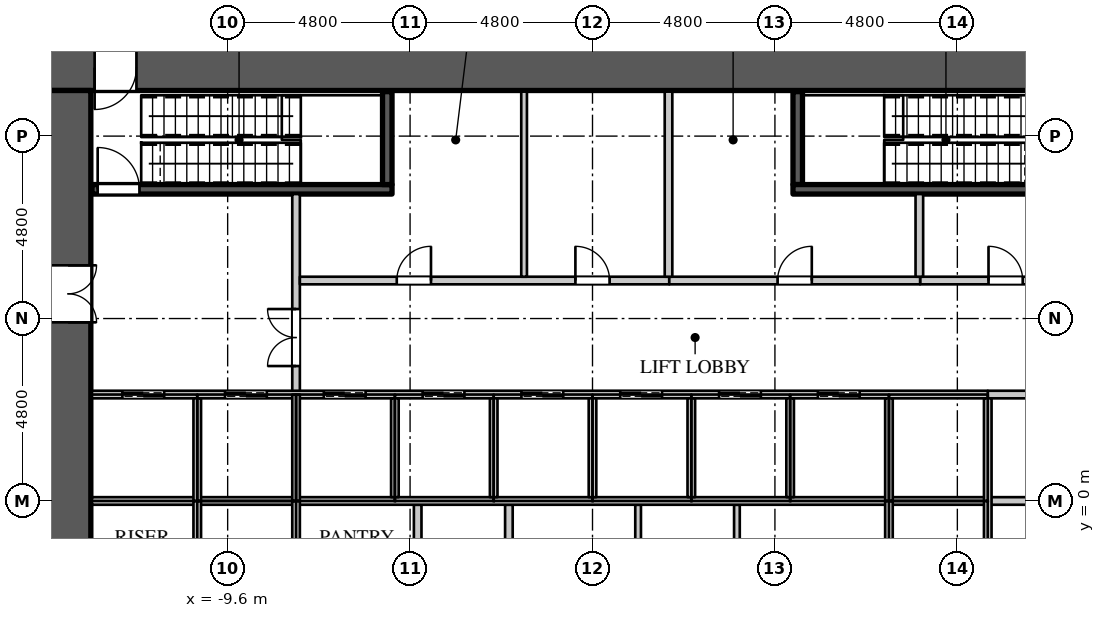
"""IFC4 building model, lengths in metres.
Left out: names, types, materials, properties, quantities, classifications, styles, units other than length and angle.
Written with IfcOpenShell. Run it as: python <this file> out.ifc"""

import sys

from ifc_helpers import new_model, si_unit, direction, frame, frame_2d, origin, place, context, subcontext, project, spatial, rectangle, extrude, element, fill, save


model = new_model("IFC4")
c1 = context("Model", 3, precision=1e-05, world=origin(), true_north=direction((0.0, 1.0)))
c2 = subcontext(c1, "Body", "Model", "MODEL_VIEW")
j1 = project(units=[si_unit("LENGTHUNIT", "METRE"), si_unit("PLANEANGLEUNIT", "RADIAN")], contexts=[c1])
p1 = place(None, origin())
s1 = spatial("IfcSite", under=j1, at=p1, CompositionType="ELEMENT")
p2 = place(p1, origin())
s2 = spatial("IfcBuilding", under=s1, at=p2, CompositionType="ELEMENT")
p3 = place(p2, frame((0.0, 0.0, 6.0)))
s3 = spatial("IfcBuildingStorey", under=s2, at=p3, CompositionType="ELEMENT", Elevation=6.0)
p4 = place(p3, frame((-14.4, 11.4, 0.0), z_axis=(0.0, 0.0, 1.0), x_axis=(1.0, 0.0, 0.0)))
e1 = element("IfcWall", 1, at=p4, inside=s3, PredefinedType="SHEAR", context=c2, shape_type="SweptSolid", body=[
    extrude(rectangle(XDim=28.8, YDim=1.2, at=frame_2d((14.4, 0.0))), origin(), (0.0, 0.0, 1.0), 5.0),
])
p5 = place(p4, frame((1.3, 0.0, 0.0)))
e2 = element("IfcOpeningElement", 2, at=p5, cuts=e1, PredefinedType="OPENING", context=c2, shape_type="SweptSolid", body=[
    extrude(rectangle(XDim=1.1, YDim=2.2, at=frame_2d((0.55, 1.1))), frame((0.0, 0.61, 0.0), z_axis=(0.0, -1.0, 0.0), x_axis=(1.0, 0.0, 0.0)), (0.0, 0.0, 1.0), 1.22),
])
p6 = place(p4, frame((26.4, 0.0, 0.0)))
e3 = element("IfcOpeningElement", 3, at=p6, cuts=e1, PredefinedType="OPENING", context=c2, shape_type="SweptSolid", body=[
    extrude(rectangle(XDim=1.1, YDim=2.2, at=frame_2d((0.55, 1.1))), frame((0.0, 0.61, 0.0), z_axis=(0.0, -1.0, 0.0), x_axis=(1.0, 0.0, 0.0)), (0.0, 0.0, 1.0), 1.22),
])
p7 = place(p3, frame((-13.8, -10.8, 0.0), z_axis=(0.0, 0.0, 1.0), x_axis=(0.0, 1.0, 0.0)))
e4 = element("IfcWall", 4, at=p7, inside=s3, PredefinedType="SHEAR", context=c2, shape_type="SweptSolid", body=[
    extrude(rectangle(XDim=21.6, YDim=1.2, at=frame_2d((10.8, 0.0))), origin(), (0.0, 0.0, 1.0), 5.0),
])
p8 = place(p7, frame((15.5, 0.0, 0.0)))
e5 = element("IfcOpeningElement", 5, at=p8, cuts=e4, PredefinedType="OPENING", context=c2, shape_type="SweptSolid", body=[
    extrude(rectangle(XDim=1.5, YDim=2.4, at=frame_2d((0.75, 1.2))), frame((0.0, 0.61, 0.0), z_axis=(0.0, -1.0, 0.0), x_axis=(1.0, 0.0, 0.0)), (0.0, 0.0, 1.0), 1.22),
])
p9 = place(p7, frame((4.5, 0.0, 0.0)))
e6 = element("IfcOpeningElement", 6, at=p9, cuts=e4, PredefinedType="OPENING", context=c2, shape_type="SweptSolid", body=[
    extrude(rectangle(XDim=1.5, YDim=2.4, at=frame_2d((0.75, 1.2))), frame((0.0, 0.61, 0.0), z_axis=(0.0, -1.0, 0.0), x_axis=(1.0, 0.0, 0.0)), (0.0, 0.0, 1.0), 1.22),
])
p10 = place(p3, frame((-7.8, 2.8, 0.0), z_axis=(0.0, 0.0, 1.0), x_axis=(0.0, 1.0, 0.0)))
e7 = element("IfcWall", 7, at=p10, inside=s3, PredefinedType="PARTITIONING", context=c2, shape_type="SweptSolid", body=[
    extrude(rectangle(XDim=5.275, YDim=0.2, at=frame_2d((2.637, 0.0))), origin(), (0.0, 0.0, 1.0), 4.4),
])
p11 = place(p10, frame((0.75, 0.0, 0.0)))
e8 = element("IfcOpeningElement", 8, at=p11, cuts=e7, PredefinedType="OPENING", context=c2, shape_type="SweptSolid", body=[
    extrude(rectangle(XDim=1.5, YDim=2.4, at=frame_2d((0.75, 1.2))), frame((0.0, 0.11, 0.0), z_axis=(0.0, -1.0, 0.0), x_axis=(1.0, 0.0, 0.0)), (0.0, 0.0, 1.0), 0.22),
])
p12 = place(p3, frame((-7.7, 5.8, 0.0), z_axis=(0.0, 0.0, 1.0), x_axis=(1.0, 0.0, 0.0)))
e9 = element("IfcWall", 9, at=p12, inside=s3, PredefinedType="PARTITIONING", context=c2, shape_type="SweptSolid", body=[
    extrude(rectangle(XDim=9.72, YDim=0.2, at=frame_2d((4.86, 0.0))), origin(), (0.0, 0.0, 1.0), 4.4),
])
p13 = place(p12, frame((2.55, 0.0, 0.0)))
e10 = element("IfcOpeningElement", 10, at=p13, cuts=e9, PredefinedType="OPENING", context=c2, shape_type="SweptSolid", body=[
    extrude(rectangle(XDim=0.9, YDim=2.2, at=frame_2d((0.45, 1.1))), frame((0.0, 0.11, 0.0), z_axis=(0.0, -1.0, 0.0), x_axis=(1.0, 0.0, 0.0)), (0.0, 0.0, 1.0), 0.22),
])
p14 = place(p12, frame((7.25, 0.0, 0.0)))
e11 = element("IfcOpeningElement", 11, at=p14, cuts=e9, PredefinedType="OPENING", context=c2, shape_type="SweptSolid", body=[
    extrude(rectangle(XDim=0.9, YDim=2.2, at=frame_2d((0.45, 1.1))), frame((0.0, 0.11, 0.0), z_axis=(0.0, -1.0, 0.0), x_axis=(1.0, 0.0, 0.0)), (0.0, 0.0, 1.0), 0.22),
])
p15 = place(p3, frame((8.62, 5.8, 0.0), z_axis=(0.0, 0.0, 1.0), x_axis=(1.0, 0.0, 0.0)))
e12 = element("IfcWall", 12, at=p15, inside=s3, PredefinedType="PARTITIONING", context=c2, shape_type="SweptSolid", body=[
    extrude(rectangle(XDim=4.55, YDim=0.2, at=frame_2d((2.275, 0.0))), origin(), (0.0, 0.0, 1.0), 4.4),
])
p16 = place(p15, frame((1.8, 0.0, 0.0)))
e13 = element("IfcOpeningElement", 13, at=p16, cuts=e12, PredefinedType="OPENING", context=c2, shape_type="SweptSolid", body=[
    extrude(rectangle(XDim=0.9, YDim=2.2, at=frame_2d((0.45, 1.1))), frame((0.0, 0.11, 0.0), z_axis=(0.0, -1.0, 0.0), x_axis=(1.0, 0.0, 0.0)), (0.0, 0.0, 1.0), 0.22),
])
p17 = place(p3, frame((-1.8, 5.9, 0.0), z_axis=(0.0, 0.0, 1.0), x_axis=(0.0, 1.0, 0.0)))
e14 = element("IfcWall", 14, at=p17, inside=s3, PredefinedType="PARTITIONING", context=c2, shape_type="SweptSolid", body=[
    extrude(rectangle(XDim=4.87, YDim=0.15, at=frame_2d((2.435, 0.0))), origin(), (0.0, 0.0, 1.0), 4.4),
])
for number, where, z_axis, x_axis in (
    (15, (1.2, -2.7, 0.0), (0.0, 0.0, 1.0), (0.0, 1.0, 0.0)),
    (16, (3.8, -2.7, 0.0), (0.0, 0.0, 1.0), (0.0, 1.0, 0.0)),
):
    element("IfcWall", number, at=place(p3, frame(where, z_axis=z_axis, x_axis=x_axis)), inside=s3, PredefinedType="PARTITIONING", context=c2, shape_type="SweptSolid", body=[
        extrude(rectangle(XDim=2.6, YDim=0.15, at=frame_2d((1.3, 0.0))), origin(), (0.0, 0.0, 1.0), 4.4),
    ])
for number, where, z_axis, x_axis in (
    (17, (-4.6, -2.7, 0.0), (0.0, 0.0, 1.0), (0.0, 1.0, 0.0)),
    (18, (-2.2, -2.7, 0.0), (0.0, 0.0, 1.0), (0.0, 1.0, 0.0)),
):
    element("IfcWall", number, at=place(p3, frame(where, z_axis=z_axis, x_axis=x_axis)), inside=s3, PredefinedType="PARTITIONING", context=c2, shape_type="SweptSolid", body=[
        extrude(rectangle(XDim=2.6, YDim=0.2, at=frame_2d((1.3, 0.0))), origin(), (0.0, 0.0, 1.0), 4.4),
    ])
p18 = place(p3, frame((2.02, 5.8, 0.0), z_axis=(0.0, 0.0, 1.0), x_axis=(1.0, 0.0, 0.0)))
e19 = element("IfcWall", 19, at=p18, inside=s3, PredefinedType="PARTITIONING", context=c2, shape_type="SweptSolid", body=[
    extrude(rectangle(XDim=6.6, YDim=0.2, at=frame_2d((3.3, 0.0))), origin(), (0.0, 0.0, 1.0), 4.4),
])
p19 = place(p18, frame((2.85, 0.0, 0.0)))
e20 = element("IfcOpeningElement", 20, at=p19, cuts=e19, PredefinedType="OPENING", context=c2, shape_type="SweptSolid", body=[
    extrude(rectangle(XDim=0.9, YDim=2.2, at=frame_2d((0.45, 1.1))), frame((0.0, 0.11, 0.0), z_axis=(0.0, -1.0, 0.0), x_axis=(1.0, 0.0, 0.0)), (0.0, 0.0, 1.0), 0.22),
])
p20 = place(p3, frame((2.0, 5.9, 0.0), z_axis=(0.0, 0.0, 1.0), x_axis=(0.0, 1.0, 0.0)))
e21 = element("IfcWall", 21, at=p20, inside=s3, PredefinedType="PARTITIONING", context=c2, shape_type="SweptSolid", body=[
    extrude(rectangle(XDim=4.87, YDim=0.2, at=frame_2d((2.435, 0.0))), origin(), (0.0, 0.0, 1.0), 4.4),
])
p21 = place(p3, frame((8.6, 5.9, 0.0), z_axis=(0.0, 0.0, 1.0), x_axis=(0.0, 1.0, 0.0)))
e22 = element("IfcWall", 22, at=p21, inside=s3, PredefinedType="PARTITIONING", context=c2, shape_type="SweptSolid", body=[
    extrude(rectangle(XDim=2.175, YDim=0.2, at=frame_2d((1.087, 0.0))), origin(), (0.0, 0.0, 1.0), 4.4),
])
p22 = place(p3, frame((10.4, 2.8, 0.0), z_axis=(0.0, 0.0, 1.0), x_axis=(1.0, 0.0, 0.0)))
e23 = element("IfcWall", 23, at=p22, inside=s3, PredefinedType="PARTITIONING", context=c2, shape_type="SweptSolid", body=[
    extrude(rectangle(XDim=2.77, YDim=0.2, at=frame_2d((1.385, 0.0))), origin(), (0.0, 0.0, 1.0), 4.4),
])
p23 = place(p22, frame((1.05, 0.0, 0.0)))
e24 = element("IfcOpeningElement", 24, at=p23, cuts=e23, PredefinedType="OPENING", context=c2, shape_type="SweptSolid", body=[
    extrude(rectangle(XDim=0.6, YDim=2.0, at=frame_2d((0.3, 1.0))), frame((0.0, 0.11, 0.0), z_axis=(0.0, -1.0, 0.0), x_axis=(1.0, 0.0, 0.0)), (0.0, 0.0, 1.0), 0.22),
])
p24 = place(p3, frame((10.4, 0.0, 0.0), z_axis=(0.0, 0.0, 1.0), x_axis=(1.0, 0.0, 0.0)))
e25 = element("IfcWall", 25, at=p24, inside=s3, PredefinedType="PARTITIONING", context=c2, shape_type="SweptSolid", body=[
    extrude(rectangle(XDim=2.77, YDim=0.2, at=frame_2d((1.385, 0.0))), origin(), (0.0, 0.0, 1.0), 4.4),
])
p25 = place(p3, frame((-13.17, 0.0, 0.0), z_axis=(0.0, 0.0, 1.0), x_axis=(1.0, 0.0, 0.0)))
e26 = element("IfcWall", 26, at=p25, inside=s3, PredefinedType="PARTITIONING", context=c2, shape_type="SweptSolid", body=[
    extrude(rectangle(XDim=23.57, YDim=0.2, at=frame_2d((11.785, 0.0))), origin(), (0.0, 0.0, 1.0), 4.4),
])
p26 = place(p3, frame((-13.17, 2.8, 0.0), z_axis=(0.0, 0.0, 1.0), x_axis=(1.0, 0.0, 0.0)))
e27 = element("IfcWall", 27, at=p26, inside=s3, PredefinedType="PARTITIONING", context=c2, shape_type="SweptSolid", body=[
    extrude(rectangle(XDim=23.57, YDim=0.2, at=frame_2d((11.785, 0.0))), origin(), (0.0, 0.0, 1.0), 4.4),
])
p27 = place(p26, frame((0.8, 0.0, 0.0)))
e28 = element("IfcOpeningElement", 28, at=p27, cuts=e27, PredefinedType="OPENING", context=c2, shape_type="SweptSolid", body=[
    extrude(rectangle(XDim=1.1, YDim=2.2, at=frame_2d((0.55, 1.1))), frame((0.0, 0.11, 0.0), z_axis=(0.0, -1.0, 0.0), x_axis=(1.0, 0.0, 0.0)), (0.0, 0.0, 1.0), 0.22),
])
p28 = place(p26, frame((3.5, 0.0, 0.0)))
e29 = element("IfcOpeningElement", 29, at=p28, cuts=e27, PredefinedType="OPENING", context=c2, shape_type="SweptSolid", body=[
    extrude(rectangle(XDim=1.1, YDim=2.2, at=frame_2d((0.55, 1.1))), frame((0.0, 0.11, 0.0), z_axis=(0.0, -1.0, 0.0), x_axis=(1.0, 0.0, 0.0)), (0.0, 0.0, 1.0), 0.22),
])
p29 = place(p26, frame((6.1, 0.0, 0.0)))
e30 = element("IfcOpeningElement", 30, at=p29, cuts=e27, PredefinedType="OPENING", context=c2, shape_type="SweptSolid", body=[
    extrude(rectangle(XDim=1.1, YDim=2.2, at=frame_2d((0.55, 1.1))), frame((0.0, 0.11, 0.0), z_axis=(0.0, -1.0, 0.0), x_axis=(1.0, 0.0, 0.0)), (0.0, 0.0, 1.0), 0.22),
])
p30 = place(p26, frame((8.7, 0.0, 0.0)))
e31 = element("IfcOpeningElement", 31, at=p30, cuts=e27, PredefinedType="OPENING", context=c2, shape_type="SweptSolid", body=[
    extrude(rectangle(XDim=1.1, YDim=2.2, at=frame_2d((0.55, 1.1))), frame((0.0, 0.11, 0.0), z_axis=(0.0, -1.0, 0.0), x_axis=(1.0, 0.0, 0.0)), (0.0, 0.0, 1.0), 0.22),
])
p31 = place(p26, frame((11.3, 0.0, 0.0)))
e32 = element("IfcOpeningElement", 32, at=p31, cuts=e27, PredefinedType="OPENING", context=c2, shape_type="SweptSolid", body=[
    extrude(rectangle(XDim=1.1, YDim=2.2, at=frame_2d((0.55, 1.1))), frame((0.0, 0.11, 0.0), z_axis=(0.0, -1.0, 0.0), x_axis=(1.0, 0.0, 0.0)), (0.0, 0.0, 1.0), 0.22),
])
p32 = place(p26, frame((13.9, 0.0, 0.0)))
e33 = element("IfcOpeningElement", 33, at=p32, cuts=e27, PredefinedType="OPENING", context=c2, shape_type="SweptSolid", body=[
    extrude(rectangle(XDim=1.1, YDim=2.2, at=frame_2d((0.55, 1.1))), frame((0.0, 0.11, 0.0), z_axis=(0.0, -1.0, 0.0), x_axis=(1.0, 0.0, 0.0)), (0.0, 0.0, 1.0), 0.22),
])
p33 = place(p26, frame((16.5, 0.0, 0.0)))
e34 = element("IfcOpeningElement", 34, at=p33, cuts=e27, PredefinedType="OPENING", context=c2, shape_type="SweptSolid", body=[
    extrude(rectangle(XDim=1.1, YDim=2.2, at=frame_2d((0.55, 1.1))), frame((0.0, 0.11, 0.0), z_axis=(0.0, -1.0, 0.0), x_axis=(1.0, 0.0, 0.0)), (0.0, 0.0, 1.0), 0.22),
])
p34 = place(p26, frame((19.1, 0.0, 0.0)))
e35 = element("IfcOpeningElement", 35, at=p34, cuts=e27, PredefinedType="OPENING", context=c2, shape_type="SweptSolid", body=[
    extrude(rectangle(XDim=1.1, YDim=2.2, at=frame_2d((0.55, 1.1))), frame((0.0, 0.11, 0.0), z_axis=(0.0, -1.0, 0.0), x_axis=(1.0, 0.0, 0.0)), (0.0, 0.0, 1.0), 0.22),
])
for number, where, z_axis, x_axis in (
    (36, (-10.4, -2.7, 0.0), (0.0, 0.0, 1.0), (0.0, 1.0, 0.0)),
    (37, (-10.4, 0.0, 0.0), (0.0, 0.0, 1.0), (0.0, 1.0, 0.0)),
):
    element("IfcWall", number, at=place(p3, frame(where, z_axis=z_axis, x_axis=x_axis)), inside=s3, PredefinedType="PARTITIONING", context=c2, shape_type="SweptSolid", body=[
        extrude(rectangle(XDim=2.7, YDim=0.2, at=frame_2d((1.35, 0.0))), origin(), (0.0, 0.0, 1.0), 4.4),
    ])
for number, where, z_axis, x_axis in (
    (38, (-7.8, -2.8, 0.0), (0.0, 0.0, 1.0), (0.0, 1.0, 0.0)),
    (39, (-7.8, 0.0, 0.0), (0.0, 0.0, 1.0), (0.0, 1.0, 0.0)),
):
    element("IfcWall", number, at=place(p3, frame(where, z_axis=z_axis, x_axis=x_axis)), inside=s3, PredefinedType="PARTITIONING", context=c2, shape_type="SweptSolid", body=[
        extrude(rectangle(XDim=2.8, YDim=0.2, at=frame_2d((1.4, 0.0))), origin(), (0.0, 0.0, 1.0), 4.4),
    ])
for number, where, z_axis, x_axis in (
    (40, (-5.2, 0.1, 0.0), (0.0, 0.0, 1.0), (0.0, 1.0, 0.0)),
    (41, (-2.6, 0.1, 0.0), (0.0, 0.0, 1.0), (0.0, 1.0, 0.0)),
    (42, (0.0, 0.1, 0.0), (0.0, 0.0, 1.0), (0.0, 1.0, 0.0)),
    (43, (2.6, 0.1, 0.0), (0.0, 0.0, 1.0), (0.0, 1.0, 0.0)),
    (44, (5.2, 0.1, 0.0), (0.0, 0.0, 1.0), (0.0, 1.0, 0.0)),
):
    element("IfcWall", number, at=place(p3, frame(where, z_axis=z_axis, x_axis=x_axis)), inside=s3, PredefinedType="PARTITIONING", context=c2, shape_type="SweptSolid", body=[
        extrude(rectangle(XDim=2.6, YDim=0.2, at=frame_2d((1.3, 0.0))), origin(), (0.0, 0.0, 1.0), 4.4),
    ])
for number, where, z_axis, x_axis in (
    (45, (7.8, -2.7, 0.0), (0.0, 0.0, 1.0), (0.0, 1.0, 0.0)),
    (46, (7.8, 0.0, 0.0), (0.0, 0.0, 1.0), (0.0, 1.0, 0.0)),
):
    element("IfcWall", number, at=place(p3, frame(where, z_axis=z_axis, x_axis=x_axis)), inside=s3, PredefinedType="PARTITIONING", context=c2, shape_type="SweptSolid", body=[
        extrude(rectangle(XDim=2.7, YDim=0.2, at=frame_2d((1.35, 0.0))), origin(), (0.0, 0.0, 1.0), 4.4),
    ])
p35 = place(p3, frame((10.4, -2.7, 0.0), z_axis=(0.0, 0.0, 1.0), x_axis=(0.0, 1.0, 0.0)))
e47 = element("IfcWall", 47, at=p35, inside=s3, PredefinedType="PARTITIONING", context=c2, shape_type="SweptSolid", body=[
    extrude(rectangle(XDim=5.4, YDim=0.2, at=frame_2d((2.7, 0.0))), origin(), (0.0, 0.0, 1.0), 4.4),
])
p36 = place(p3, frame((-13.17, 8.2, 0.0), z_axis=(0.0, 0.0, 1.0), x_axis=(1.0, 0.0, 0.0)))
e48 = element("IfcWall", 48, at=p36, inside=s3, PredefinedType="SHEAR", context=c2, shape_type="SweptSolid", body=[
    extrude(rectangle(XDim=7.895, YDim=0.25, at=frame_2d((3.948, 0.0))), origin(), (0.0, 0.0, 1.0), 4.65),
])
p37 = place(p36, frame((0.15, 0.0, 0.0)))
e49 = element("IfcOpeningElement", 49, at=p37, cuts=e48, PredefinedType="OPENING", context=c2, shape_type="SweptSolid", body=[
    extrude(rectangle(XDim=1.1, YDim=2.2, at=frame_2d((0.55, 1.1))), frame((0.0, 0.135, 0.0), z_axis=(0.0, -1.0, 0.0), x_axis=(1.0, 0.0, 0.0)), (0.0, 0.0, 1.0), 0.27),
])
for number, where, z_axis, x_axis in (
    (50, (-5.4, 8.325, 0.0), (0.0, 0.0, 1.0), (0.0, 1.0, 0.0)),
    (51, (5.4, 8.325, 0.0), (0.0, 0.0, 1.0), (0.0, 1.0, 0.0)),
):
    element("IfcWall", number, at=place(p3, frame(where, z_axis=z_axis, x_axis=x_axis)), inside=s3, PredefinedType="SHEAR", context=c2, shape_type="SweptSolid", body=[
        extrude(rectangle(XDim=2.445, YDim=0.25, at=frame_2d((1.223, 0.0))), origin(), (0.0, 0.0, 1.0), 4.65),
    ])
p38 = place(p3, frame((5.275, 8.2, 0.0), z_axis=(0.0, 0.0, 1.0), x_axis=(1.0, 0.0, 0.0)))
e52 = element("IfcWall", 52, at=p38, inside=s3, PredefinedType="SHEAR", context=c2, shape_type="SweptSolid", body=[
    extrude(rectangle(XDim=7.895, YDim=0.25, at=frame_2d((3.948, 0.0))), origin(), (0.0, 0.0, 1.0), 4.65),
])
p39 = place(p13, origin())
e53 = element("IfcDoor", 53, at=p39, inside=s3, OperationType="SINGLE_SWING_RIGHT", PredefinedType="DOOR", context=c2, shape_type="SweptSolid", body=[
    extrude(rectangle(XDim=0.9, YDim=2.2, at=frame_2d((0.45, 1.1))), frame((0.0, 0.025, 0.0), z_axis=(0.0, -1.0, 0.0), x_axis=(1.0, 0.0, 0.0)), (0.0, 0.0, 1.0), 0.05),
])
fill(e10, e53)
p40 = place(p14, origin())
e54 = element("IfcDoor", 54, at=p40, inside=s3, OperationType="SINGLE_SWING_LEFT", PredefinedType="DOOR", context=c2, shape_type="SweptSolid", body=[
    extrude(rectangle(XDim=0.9, YDim=2.2, at=frame_2d((0.45, 1.1))), frame((0.0, 0.025, 0.0), z_axis=(0.0, -1.0, 0.0), x_axis=(1.0, 0.0, 0.0)), (0.0, 0.0, 1.0), 0.05),
])
fill(e11, e54)
p41 = place(p19, origin())
e55 = element("IfcDoor", 55, at=p41, inside=s3, OperationType="SINGLE_SWING_RIGHT", PredefinedType="DOOR", context=c2, shape_type="SweptSolid", body=[
    extrude(rectangle(XDim=0.9, YDim=2.2, at=frame_2d((0.45, 1.1))), frame((0.0, 0.025, 0.0), z_axis=(0.0, -1.0, 0.0), x_axis=(1.0, 0.0, 0.0)), (0.0, 0.0, 1.0), 0.05),
])
fill(e20, e55)
p42 = place(p16, origin())
e56 = element("IfcDoor", 56, at=p42, inside=s3, OperationType="SINGLE_SWING_LEFT", PredefinedType="DOOR", context=c2, shape_type="SweptSolid", body=[
    extrude(rectangle(XDim=0.9, YDim=2.2, at=frame_2d((0.45, 1.1))), frame((0.0, 0.025, 0.0), z_axis=(0.0, -1.0, 0.0), x_axis=(1.0, 0.0, 0.0)), (0.0, 0.0, 1.0), 0.05),
])
fill(e13, e56)
p43 = place(p27, origin())
e57 = element("IfcDoor", 57, at=p43, inside=s3, OperationType="DOUBLE_DOOR_SLIDING", PredefinedType="DOOR", context=c2, shape_type="SweptSolid", body=[
    extrude(rectangle(XDim=1.1, YDim=2.2, at=frame_2d((0.55, 1.1))), frame((0.0, 0.025, 0.0), z_axis=(0.0, -1.0, 0.0), x_axis=(1.0, 0.0, 0.0)), (0.0, 0.0, 1.0), 0.05),
])
fill(e28, e57)
p44 = place(p28, origin())
e58 = element("IfcDoor", 58, at=p44, inside=s3, OperationType="DOUBLE_DOOR_SLIDING", PredefinedType="DOOR", context=c2, shape_type="SweptSolid", body=[
    extrude(rectangle(XDim=1.1, YDim=2.2, at=frame_2d((0.55, 1.1))), frame((0.0, 0.025, 0.0), z_axis=(0.0, -1.0, 0.0), x_axis=(1.0, 0.0, 0.0)), (0.0, 0.0, 1.0), 0.05),
])
fill(e29, e58)
p45 = place(p29, origin())
e59 = element("IfcDoor", 59, at=p45, inside=s3, OperationType="DOUBLE_DOOR_SLIDING", PredefinedType="DOOR", context=c2, shape_type="SweptSolid", body=[
    extrude(rectangle(XDim=1.1, YDim=2.2, at=frame_2d((0.55, 1.1))), frame((0.0, 0.025, 0.0), z_axis=(0.0, -1.0, 0.0), x_axis=(1.0, 0.0, 0.0)), (0.0, 0.0, 1.0), 0.05),
])
fill(e30, e59)
p46 = place(p30, origin())
e60 = element("IfcDoor", 60, at=p46, inside=s3, OperationType="DOUBLE_DOOR_SLIDING", PredefinedType="DOOR", context=c2, shape_type="SweptSolid", body=[
    extrude(rectangle(XDim=1.1, YDim=2.2, at=frame_2d((0.55, 1.1))), frame((0.0, 0.025, 0.0), z_axis=(0.0, -1.0, 0.0), x_axis=(1.0, 0.0, 0.0)), (0.0, 0.0, 1.0), 0.05),
])
fill(e31, e60)
p47 = place(p31, origin())
e61 = element("IfcDoor", 61, at=p47, inside=s3, OperationType="DOUBLE_DOOR_SLIDING", PredefinedType="DOOR", context=c2, shape_type="SweptSolid", body=[
    extrude(rectangle(XDim=1.1, YDim=2.2, at=frame_2d((0.55, 1.1))), frame((0.0, 0.025, 0.0), z_axis=(0.0, -1.0, 0.0), x_axis=(1.0, 0.0, 0.0)), (0.0, 0.0, 1.0), 0.05),
])
fill(e32, e61)
p48 = place(p32, origin())
e62 = element("IfcDoor", 62, at=p48, inside=s3, OperationType="DOUBLE_DOOR_SLIDING", PredefinedType="DOOR", context=c2, shape_type="SweptSolid", body=[
    extrude(rectangle(XDim=1.1, YDim=2.2, at=frame_2d((0.55, 1.1))), frame((0.0, 0.025, 0.0), z_axis=(0.0, -1.0, 0.0), x_axis=(1.0, 0.0, 0.0)), (0.0, 0.0, 1.0), 0.05),
])
fill(e33, e62)
p49 = place(p33, origin())
e63 = element("IfcDoor", 63, at=p49, inside=s3, OperationType="DOUBLE_DOOR_SLIDING", PredefinedType="DOOR", context=c2, shape_type="SweptSolid", body=[
    extrude(rectangle(XDim=1.1, YDim=2.2, at=frame_2d((0.55, 1.1))), frame((0.0, 0.025, 0.0), z_axis=(0.0, -1.0, 0.0), x_axis=(1.0, 0.0, 0.0)), (0.0, 0.0, 1.0), 0.05),
])
fill(e34, e63)
p50 = place(p34, origin())
e64 = element("IfcDoor", 64, at=p50, inside=s3, OperationType="DOUBLE_DOOR_SLIDING", PredefinedType="DOOR", context=c2, shape_type="SweptSolid", body=[
    extrude(rectangle(XDim=1.1, YDim=2.2, at=frame_2d((0.55, 1.1))), frame((0.0, 0.025, 0.0), z_axis=(0.0, -1.0, 0.0), x_axis=(1.0, 0.0, 0.0)), (0.0, 0.0, 1.0), 0.05),
])
fill(e35, e64)
p51 = place(p37, origin())
e65 = element("IfcDoor", 65, at=p51, inside=s3, OperationType="SINGLE_SWING_LEFT", PredefinedType="DOOR", context=c2, shape_type="SweptSolid", body=[
    extrude(rectangle(XDim=1.1, YDim=2.2, at=frame_2d((0.55, 1.1))), frame((0.0, 0.025, 0.0), z_axis=(0.0, -1.0, 0.0), x_axis=(1.0, 0.0, 0.0)), (0.0, 0.0, 1.0), 0.05),
])
fill(e49, e65)
p52 = place(p11, origin())
e66 = element("IfcDoor", 66, at=p52, inside=s3, OperationType="DOUBLE_DOOR_SINGLE_SWING", PredefinedType="DOOR", context=c2, shape_type="SweptSolid", body=[
    extrude(rectangle(XDim=1.5, YDim=2.4, at=frame_2d((0.75, 1.2))), frame((0.0, 0.025, 0.0), z_axis=(0.0, -1.0, 0.0), x_axis=(1.0, 0.0, 0.0)), (0.0, 0.0, 1.0), 0.05),
])
fill(e8, e66)
p53 = place(p8, origin())
e67 = element("IfcDoor", 67, at=p53, inside=s3, OperationType="DOUBLE_DOOR_SINGLE_SWING", PredefinedType="DOOR", context=c2, shape_type="SweptSolid", body=[
    extrude(rectangle(XDim=1.5, YDim=2.4, at=frame_2d((0.75, 1.2))), frame((0.0, 0.025, 0.0), z_axis=(0.0, -1.0, 0.0), x_axis=(1.0, 0.0, 0.0)), (0.0, 0.0, 1.0), 0.05),
])
fill(e5, e67)
p54 = place(p5, origin())
e68 = element("IfcDoor", 68, at=p54, inside=s3, OperationType="SINGLE_SWING_RIGHT", PredefinedType="DOOR", context=c2, shape_type="SweptSolid", body=[
    extrude(rectangle(XDim=1.1, YDim=2.2, at=frame_2d((0.55, 1.1))), frame((0.0, 0.025, 0.0), z_axis=(0.0, -1.0, 0.0), x_axis=(1.0, 0.0, 0.0)), (0.0, 0.0, 1.0), 0.05),
])
fill(e2, e68)
save(model, sys.argv[1])
